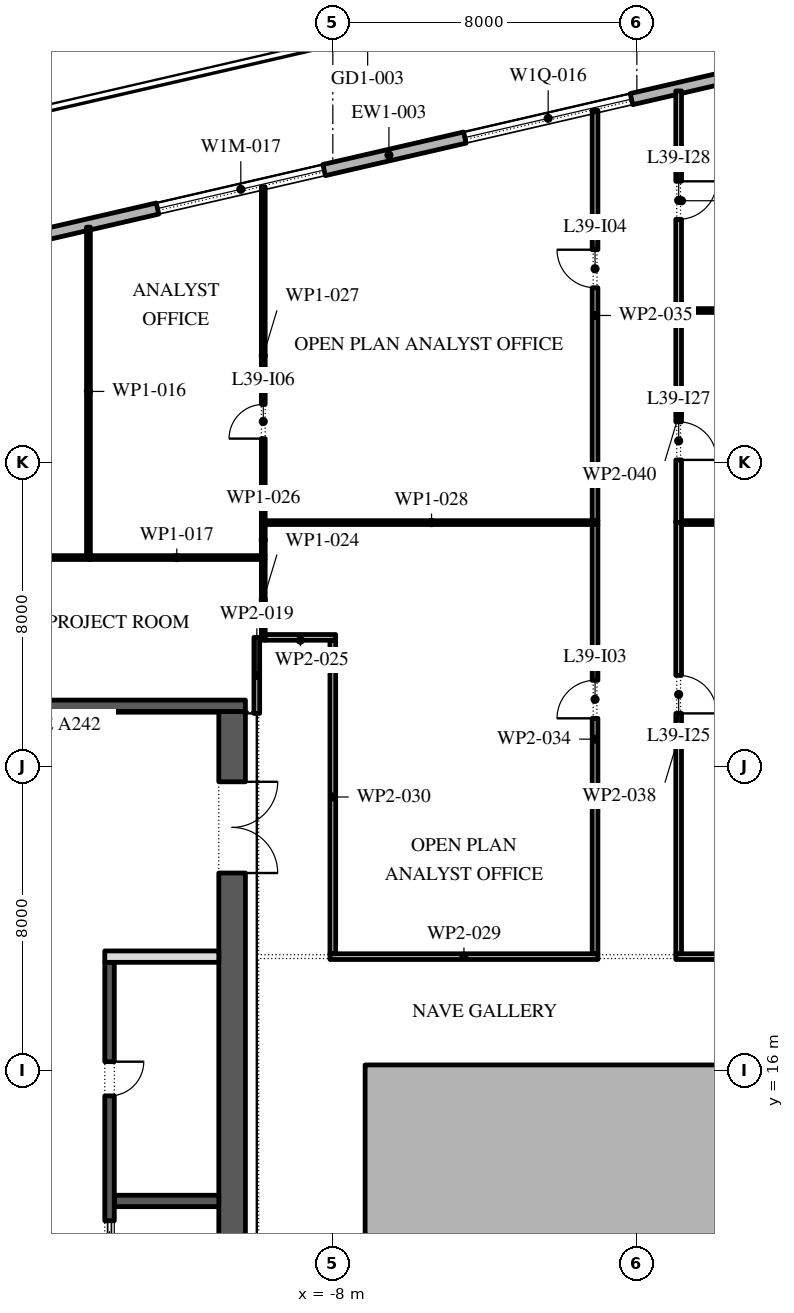
"""IFC4 building model, lengths in metres.
Left out: names, types, materials, properties, quantities, classifications, styles, units other than length and angle.
Written with IfcOpenShell. Run it as: python <this file> out.ifc"""

import sys

from ifc_helpers import new_model, si_unit, direction, frame, frame_2d, origin, origin_2d, place, context, subcontext, project, spatial, polyline, rectangle, outline, extrude, element, fill, save


model = new_model("IFC4")
c1 = context("Model", 3, precision=1e-05, world=origin(), true_north=direction((0.0, 1.0)))
c2 = subcontext(c1, "Body", "Model", "MODEL_VIEW")
j1 = project(units=[si_unit("LENGTHUNIT", "METRE"), si_unit("PLANEANGLEUNIT", "RADIAN")], contexts=[c1])
p1 = place(None, origin())
s1 = spatial("IfcSite", under=j1, at=p1, CompositionType="ELEMENT")
p2 = place(p1, origin())
s2 = spatial("IfcBuilding", under=s1, at=p2, CompositionType="ELEMENT")
p3 = place(p2, frame((0.0, 0.0, 180.0)))
s3 = spatial("IfcBuildingStorey", under=s2, at=p3, CompositionType="ELEMENT", Elevation=180.0)
p4 = place(p3, frame((-16.09, 41.74, 0.0), z_axis=(-0.018825666958, 0.081616506903, 0.99648599592), x_axis=(-0.974414501624, -0.224758490439, 0.0)))
e1 = element("IfcColumn", 1, at=p4, inside=s3, PredefinedType="COLUMN", context=c2, shape_type="SweptSolid", body=[
    extrude(rectangle(XDim=1.2, YDim=1.2, at=origin_2d()), origin(), (0.0, 0.0, 1.0), 4.215),
])
p5 = place(p3, origin())
e2 = element("IfcWall", 2, at=p5, inside=s3, PredefinedType="STANDARD", context=c2, shape_type="SweptSolid", body=[
    extrude(outline(polyline([(-7.15, -2.15), (7.15, -2.15), (7.15, 16.15), (-7.15, 16.15), (-7.15, -2.15)]), holes=[polyline([(-7.0, -2.0), (-7.0, 16.0), (7.0, 16.0), (7.0, -2.0), (-7.0, -2.0)])]), origin(), (0.0, 0.0, 1.0), 4.0),
])
p6 = place(p3, frame((17.592, 45.657, 0.0), z_axis=(0.0, 0.0, 1.0), x_axis=(-0.974370243697, -0.224950279389, 0.0)))
e3 = element("IfcWall", 3, at=p6, inside=s3, PredefinedType="STANDARD", context=c2, shape_type="SweptSolid", body=[
    extrude(rectangle(XDim=49.5, YDim=0.3, at=frame_2d((24.75, 0.0))), origin(), (0.0, 0.0, 1.0), 4.0),
])
p7 = place(p6, frame((2.8, 0.0, 0.0)))
e4 = element("IfcOpeningElement", 4, at=p7, cuts=e3, PredefinedType="OPENING", context=c2, shape_type="SweptSolid", body=[
    extrude(rectangle(XDim=2.4, YDim=3.5, at=frame_2d((1.2, 1.75))), frame((0.0, 0.16, 0.0), z_axis=(0.0, -1.0, 0.0), x_axis=(1.0, 0.0, 0.0)), (0.0, 0.0, 1.0), 0.32),
])
p8 = place(p6, frame((9.9, 0.0, 0.45)))
e5 = element("IfcOpeningElement", 5, at=p8, cuts=e3, PredefinedType="OPENING", context=c2, shape_type="SweptSolid", body=[
    extrude(rectangle(XDim=4.5, YDim=2.45, at=frame_2d((2.25, 1.225))), frame((0.0, 0.16, 0.0), z_axis=(0.0, -1.0, 0.0), x_axis=(1.0, 0.0, 0.0)), (0.0, 0.0, 1.0), 0.32),
])
p9 = place(p6, frame((18.2, 0.0, 0.45)))
e6 = element("IfcOpeningElement", 6, at=p9, cuts=e3, PredefinedType="OPENING", context=c2, shape_type="SweptSolid", body=[
    extrude(rectangle(XDim=4.5, YDim=2.45, at=frame_2d((2.25, 1.225))), frame((0.0, 0.16, 0.0), z_axis=(0.0, -1.0, 0.0), x_axis=(1.0, 0.0, 0.0)), (0.0, 0.0, 1.0), 0.32),
])
p10 = place(p6, frame((26.5, 0.0, 0.45)))
e7 = element("IfcOpeningElement", 7, at=p10, cuts=e3, PredefinedType="OPENING", context=c2, shape_type="SweptSolid", body=[
    extrude(rectangle(XDim=4.5, YDim=2.575, at=frame_2d((2.25, 1.288))), frame((0.0, 0.16, 0.0), z_axis=(0.0, -1.0, 0.0), x_axis=(1.0, 0.0, 0.0)), (0.0, 0.0, 1.0), 0.32),
])
p11 = place(p6, frame((35.85, 0.0, 0.0)))
e8 = element("IfcOpeningElement", 8, at=p11, cuts=e3, PredefinedType="OPENING", context=c2, shape_type="SweptSolid", body=[
    extrude(rectangle(XDim=2.4, YDim=3.5, at=frame_2d((1.2, 1.75))), frame((0.0, 0.16, 0.0), z_axis=(0.0, -1.0, 0.0), x_axis=(1.0, 0.0, 0.0)), (0.0, 0.0, 1.0), 0.32),
])
p12 = place(p6, frame((43.1, 0.0, 0.45)))
e9 = element("IfcOpeningElement", 9, at=p12, cuts=e3, PredefinedType="OPENING", context=c2, shape_type="SweptSolid", body=[
    extrude(rectangle(XDim=4.5, YDim=2.75, at=frame_2d((2.25, 1.375))), frame((0.0, 0.16, 0.0), z_axis=(0.0, -1.0, 0.0), x_axis=(1.0, 0.0, 0.0)), (0.0, 0.0, 1.0), 0.32),
])
p13 = place(p3, frame((-10.65, -2.45, 0.0), z_axis=(0.0, 0.0, 1.0), x_axis=(0.0, 1.0, 0.0)))
e10 = element("IfcWall", 10, at=p13, inside=s3, PredefinedType="SHEAR", context=c2, shape_type="SweptSolid", body=[
    extrude(rectangle(XDim=27.9, YDim=0.7, at=frame_2d((13.95, 0.0))), origin(), (0.0, 0.0, 1.0), 4.0),
])
p14 = place(p13, frame((23.65, 0.0, 0.0)))
e11 = element("IfcOpeningElement", 11, at=p14, cuts=e10, PredefinedType="OPENING", context=c2, shape_type="SweptSolid", body=[
    extrude(rectangle(XDim=2.4, YDim=2.1, at=frame_2d((1.2, 1.05))), frame((0.0, 0.36, 0.0), z_axis=(0.0, -1.0, 0.0), x_axis=(1.0, 0.0, 0.0)), (0.0, 0.0, 1.0), 0.72),
])
p15 = place(p13, frame((1.087, 0.0, 0.0)))
e12 = element("IfcOpeningElement", 12, at=p15, cuts=e10, PredefinedType="OPENING", context=c2, shape_type="SweptSolid", body=[
    extrude(rectangle(XDim=0.9, YDim=2.1, at=frame_2d((0.45, 1.05))), frame((0.0, 0.36, 0.0), z_axis=(0.0, -1.0, 0.0), x_axis=(1.0, 0.0, 0.0)), (0.0, 0.0, 1.0), 0.72),
])
p16 = place(p13, frame((4.262, 0.0, 0.0)))
e13 = element("IfcOpeningElement", 13, at=p16, cuts=e10, PredefinedType="OPENING", context=c2, shape_type="SweptSolid", body=[
    extrude(rectangle(XDim=1.0, YDim=2.1, at=frame_2d((0.5, 1.05))), frame((0.0, 0.36, 0.0), z_axis=(0.0, -1.0, 0.0), x_axis=(1.0, 0.0, 0.0)), (0.0, 0.0, 1.0), 0.72),
])
p17 = place(p3, frame((-21.7, 25.6, 0.0), z_axis=(0.0, 0.0, 1.0), x_axis=(1.0, 0.0, 0.0)))
e14 = element("IfcWall", 14, at=p17, inside=s3, PredefinedType="SHEAR", context=c2, shape_type="SweptSolid", body=[
    extrude(rectangle(XDim=11.4, YDim=0.3, at=frame_2d((5.7, 0.0))), origin(), (0.0, 0.0, 1.0), 4.0),
])
p18 = place(p3, frame((-13.75, 12.571, 0.0), z_axis=(0.0, 0.0, 1.0), x_axis=(1.0, 0.0, 0.0)))
e15 = element("IfcWall", 15, at=p18, inside=s3, PredefinedType="SHEAR", context=c2, shape_type="SweptSolid", body=[
    extrude(rectangle(XDim=2.75, YDim=0.3, at=frame_2d((1.375, 0.0))), origin(), (0.0, 0.0, 1.0), 4.0),
])
p19 = place(p3, frame((-13.875, -2.45, 0.0), z_axis=(0.0, 0.0, 1.0), x_axis=(0.0, 1.0, 0.0)))
e16 = element("IfcWall", 16, at=p19, inside=s3, PredefinedType="SHEAR", context=c2, shape_type="SweptSolid", body=[
    extrude(rectangle(XDim=21.3, YDim=0.25, at=frame_2d((10.65, 0.0))), origin(), (0.0, 0.0, 1.0), 4.0),
])
p20 = place(p19, frame((17.786, 0.0, 0.0)))
e17 = element("IfcOpeningElement", 17, at=p20, cuts=e16, PredefinedType="OPENING", context=c2, shape_type="SweptSolid", body=[
    extrude(rectangle(XDim=0.9, YDim=2.1, at=frame_2d((0.45, 1.05))), frame((0.0, 0.135, 0.0), z_axis=(0.0, -1.0, 0.0), x_axis=(1.0, 0.0, 0.0)), (0.0, 0.0, 1.0), 0.27),
])
p21 = place(p19, frame((6.971, 0.0, 0.0)))
e18 = element("IfcOpeningElement", 18, at=p21, cuts=e16, PredefinedType="OPENING", context=c2, shape_type="SweptSolid", body=[
    extrude(rectangle(XDim=1.1, YDim=2.1, at=frame_2d((0.55, 1.05))), frame((0.0, 0.135, 0.0), z_axis=(0.0, -1.0, 0.0), x_axis=(1.0, 0.0, 0.0)), (0.0, 0.0, 1.0), 0.27),
])
p22 = place(p19, frame((9.114, 0.0, 0.0)))
e19 = element("IfcOpeningElement", 19, at=p22, cuts=e16, PredefinedType="OPENING", context=c2, shape_type="SweptSolid", body=[
    extrude(rectangle(XDim=1.1, YDim=2.1, at=frame_2d((0.55, 1.05))), frame((0.0, 0.135, 0.0), z_axis=(0.0, -1.0, 0.0), x_axis=(1.0, 0.0, 0.0)), (0.0, 0.0, 1.0), 0.27),
])
p23 = place(p19, frame((11.257, 0.0, 0.0)))
e20 = element("IfcOpeningElement", 20, at=p23, cuts=e16, PredefinedType="OPENING", context=c2, shape_type="SweptSolid", body=[
    extrude(rectangle(XDim=1.1, YDim=2.1, at=frame_2d((0.55, 1.05))), frame((0.0, 0.135, 0.0), z_axis=(0.0, -1.0, 0.0), x_axis=(1.0, 0.0, 0.0)), (0.0, 0.0, 1.0), 0.27),
])
p24 = place(p19, frame((13.4, 0.0, 0.0)))
e21 = element("IfcOpeningElement", 21, at=p24, cuts=e16, PredefinedType="OPENING", context=c2, shape_type="SweptSolid", body=[
    extrude(rectangle(XDim=1.1, YDim=2.1, at=frame_2d((0.55, 1.05))), frame((0.0, 0.135, 0.0), z_axis=(0.0, -1.0, 0.0), x_axis=(1.0, 0.0, 0.0)), (0.0, 0.0, 1.0), 0.27),
])
p25 = place(p3, frame((-14.0, 19.0, 0.0), z_axis=(0.0, 0.0, 1.0), x_axis=(1.0, 0.0, 0.0)))
e22 = element("IfcWall", 22, at=p25, inside=s3, PredefinedType="PARTITIONING", context=c2, shape_type="SweptSolid", body=[
    extrude(rectangle(XDim=3.0, YDim=0.3, at=frame_2d((1.5, 0.0))), origin(), (0.0, 0.0, 1.0), 4.0),
])
p26 = place(p3, frame((-22.47, 29.5, 0.0), z_axis=(0.0, 0.0, 1.0), x_axis=(1.0, 0.0, 0.0)))
e23 = element("IfcWall", 23, at=p26, inside=s3, PredefinedType="PARTITIONING", context=c2, shape_type="SweptSolid", body=[
    extrude(rectangle(XDim=8.09, YDim=0.1, at=frame_2d((4.045, 0.0))), origin(), (0.0, 0.0, 1.0), 4.0),
])
p27 = place(p26, frame((3.44, 0.0, 0.0)))
e24 = element("IfcOpeningElement", 24, at=p27, cuts=e23, PredefinedType="OPENING", context=c2, shape_type="SweptSolid", body=[
    extrude(rectangle(XDim=0.9, YDim=2.1, at=frame_2d((0.45, 1.05))), frame((0.0, 0.06, 0.0), z_axis=(0.0, -1.0, 0.0), x_axis=(1.0, 0.0, 0.0)), (0.0, 0.0, 1.0), 0.12),
])
p28 = place(p3, frame((-14.43, 29.55, 0.0), z_axis=(0.0, 0.0, 1.0), x_axis=(0.0, 1.0, 0.0)))
e25 = element("IfcWall", 25, at=p28, inside=s3, PredefinedType="PARTITIONING", context=c2, shape_type="SweptSolid", body=[
    extrude(rectangle(XDim=8.643, YDim=0.1, at=frame_2d((4.322, 0.0))), origin(), (0.0, 0.0, 1.0), 4.0),
])
p29 = place(p3, frame((-14.43, 29.5, 0.0), z_axis=(0.0, 0.0, 1.0), x_axis=(1.0, 0.0, 0.0)))
e26 = element("IfcWall", 26, at=p29, inside=s3, PredefinedType="PARTITIONING", context=c2, shape_type="SweptSolid", body=[
    extrude(rectangle(XDim=4.65, YDim=0.1, at=frame_2d((2.325, 0.0))), origin(), (0.0, 0.0, 1.0), 4.0),
])
p30 = place(p3, frame((-10.0, 25.4, 0.0), z_axis=(0.0, 0.0, 1.0), x_axis=(0.0, 1.0, 0.0)))
e27 = element("IfcWall", 27, at=p30, inside=s3, PredefinedType="PARTITIONING", context=c2, shape_type="SweptSolid", body=[
    extrude(rectangle(XDim=2.0, YDim=0.15, at=frame_2d((1.0, 0.0))), origin(), (0.0, 0.0, 1.0), 4.0),
])
p31 = place(p3, frame((-9.83, 27.325, 0.0), z_axis=(0.0, 0.0, 1.0), x_axis=(0.0, 1.0, 0.0)))
e28 = element("IfcWall", 28, at=p31, inside=s3, PredefinedType="PARTITIONING", context=c2, shape_type="SweptSolid", body=[
    extrude(rectangle(XDim=2.125, YDim=0.1, at=frame_2d((1.062, 0.0))), origin(), (0.0, 0.0, 1.0), 4.0),
])
p32 = place(p3, frame((-9.78, 27.4, 0.0), z_axis=(0.0, 0.0, 1.0), x_axis=(1.0, 0.0, 0.0)))
e29 = element("IfcWall", 29, at=p32, inside=s3, PredefinedType="PARTITIONING", context=c2, shape_type="SweptSolid", body=[
    extrude(rectangle(XDim=1.855, YDim=0.15, at=frame_2d((0.927, 0.0))), origin(), (0.0, 0.0, 1.0), 4.0),
])
p33 = place(p3, frame((-9.83, 29.55, 0.0), z_axis=(0.0, 0.0, 1.0), x_axis=(0.0, 1.0, 0.0)))
e30 = element("IfcWall", 30, at=p33, inside=s3, PredefinedType="PARTITIONING", context=c2, shape_type="SweptSolid", body=[
    extrude(rectangle(XDim=0.82, YDim=0.1, at=frame_2d((0.41, 0.0))), origin(), (0.0, 0.0, 1.0), 4.0),
])
p34 = place(p3, frame((-9.83, 30.37, 0.0), z_axis=(0.0, 0.0, 1.0), x_axis=(0.0, 1.0, 0.0)))
e31 = element("IfcWall", 31, at=p34, inside=s3, PredefinedType="PARTITIONING", context=c2, shape_type="SweptSolid", body=[
    extrude(rectangle(XDim=8.885, YDim=0.1, at=frame_2d((4.442, 0.0))), origin(), (0.0, 0.0, 1.0), 4.0),
])
p35 = place(p34, frame((2.26, 0.0, 0.0)))
e32 = element("IfcOpeningElement", 32, at=p35, cuts=e31, PredefinedType="OPENING", context=c2, shape_type="SweptSolid", body=[
    extrude(rectangle(XDim=0.9, YDim=2.1, at=frame_2d((0.45, 1.05))), frame((0.0, 0.06, 0.0), z_axis=(0.0, -1.0, 0.0), x_axis=(1.0, 0.0, 0.0)), (0.0, 0.0, 1.0), 0.12),
])
p36 = place(p3, frame((-9.78, 30.42, 0.0), z_axis=(0.0, 0.0, 1.0), x_axis=(1.0, 0.0, 0.0)))
e33 = element("IfcWall", 33, at=p36, inside=s3, PredefinedType="PARTITIONING", context=c2, shape_type="SweptSolid", body=[
    extrude(rectangle(XDim=8.755, YDim=0.1, at=frame_2d((4.377, 0.0))), origin(), (0.0, 0.0, 1.0), 4.0),
])
p37 = place(p3, frame((-8.075, 19.0, 0.0), z_axis=(0.0, 0.0, 1.0), x_axis=(1.0, 0.0, 0.0)))
e34 = element("IfcWall", 34, at=p37, inside=s3, PredefinedType="PARTITIONING", context=c2, shape_type="SweptSolid", body=[
    extrude(rectangle(XDim=7.05, YDim=0.15, at=frame_2d((3.525, 0.0))), origin(), (0.0, 0.0, 1.0), 4.0),
])
p38 = place(p3, frame((-8.0, 27.325, 0.0), z_axis=(0.0, 0.0, 1.0), x_axis=(0.0, -1.0, 0.0)))
e35 = element("IfcWall", 35, at=p38, inside=s3, PredefinedType="PARTITIONING", context=c2, shape_type="SweptSolid", body=[
    extrude(rectangle(XDim=8.25, YDim=0.15, at=frame_2d((4.125, 0.0))), origin(), (0.0, 0.0, 1.0), 4.0),
])
p39 = place(p3, frame((-1.1, 19.075, 0.0), z_axis=(0.0, 0.0, 1.0), x_axis=(0.0, 1.0, 0.0)))
e36 = element("IfcWall", 36, at=p39, inside=s3, PredefinedType="PARTITIONING", context=c2, shape_type="SweptSolid", body=[
    extrude(rectangle(XDim=11.295, YDim=0.15, at=frame_2d((5.647, 0.0))), origin(), (0.0, 0.0, 1.0), 4.0),
])
p40 = place(p39, frame((6.195, 0.0, 0.0)))
e37 = element("IfcOpeningElement", 37, at=p40, cuts=e36, PredefinedType="OPENING", context=c2, shape_type="SweptSolid", body=[
    extrude(rectangle(XDim=1.0, YDim=2.1, at=frame_2d((0.5, 1.05))), frame((0.0, 0.085, 0.0), z_axis=(0.0, -1.0, 0.0), x_axis=(1.0, 0.0, 0.0)), (0.0, 0.0, 1.0), 0.17),
])
p41 = place(p3, frame((-1.1, 30.47, 0.0), z_axis=(0.0, 0.0, 1.0), x_axis=(0.0, 1.0, 0.0)))
e38 = element("IfcWall", 38, at=p41, inside=s3, PredefinedType="PARTITIONING", context=c2, shape_type="SweptSolid", body=[
    extrude(rectangle(XDim=10.8, YDim=0.15, at=frame_2d((5.4, 0.0))), origin(), (0.0, 0.0, 1.0), 4.0),
])
p42 = place(p41, frame((6.13, 0.0, 0.0)))
e39 = element("IfcOpeningElement", 39, at=p42, cuts=e38, PredefinedType="OPENING", context=c2, shape_type="SweptSolid", body=[
    extrude(rectangle(XDim=1.0, YDim=2.1, at=frame_2d((0.5, 1.05))), frame((0.0, 0.085, 0.0), z_axis=(0.0, -1.0, 0.0), x_axis=(1.0, 0.0, 0.0)), (0.0, 0.0, 1.0), 0.17),
])
p43 = place(p3, frame((1.025, 19.0, 0.0), z_axis=(0.0, 0.0, 1.0), x_axis=(1.0, 0.0, 0.0)))
e40 = element("IfcWall", 40, at=p43, inside=s3, PredefinedType="PARTITIONING", context=c2, shape_type="SweptSolid", body=[
    extrude(rectangle(XDim=7.05, YDim=0.15, at=frame_2d((3.525, 0.0))), origin(), (0.0, 0.0, 1.0), 4.0),
])
p44 = place(p3, frame((1.1, 30.47, 0.0), z_axis=(0.0, 0.0, 1.0), x_axis=(0.0, -1.0, 0.0)))
e41 = element("IfcWall", 41, at=p44, inside=s3, PredefinedType="PARTITIONING", context=c2, shape_type="SweptSolid", body=[
    extrude(rectangle(XDim=11.395, YDim=0.15, at=frame_2d((5.698, 0.0))), origin(), (0.0, 0.0, 1.0), 4.0),
])
p45 = place(p44, frame((4.07, 0.0, 0.0)))
e42 = element("IfcOpeningElement", 42, at=p45, cuts=e41, PredefinedType="OPENING", context=c2, shape_type="SweptSolid", body=[
    extrude(rectangle(XDim=1.0, YDim=2.1, at=frame_2d((0.5, 1.05))), frame((0.0, 0.085, 0.0), z_axis=(0.0, -1.0, 0.0), x_axis=(1.0, 0.0, 0.0)), (0.0, 0.0, 1.0), 0.17),
])
p46 = place(p3, frame((1.175, 30.42, 0.0), z_axis=(0.0, 0.0, 1.0), x_axis=(1.0, 0.0, 0.0)))
e43 = element("IfcWall", 43, at=p46, inside=s3, PredefinedType="PARTITIONING", context=c2, shape_type="SweptSolid", body=[
    extrude(rectangle(XDim=9.375, YDim=0.1, at=frame_2d((4.688, 0.0))), origin(), (0.0, 0.0, 1.0), 4.0),
])
p47 = place(p3, frame((1.1, 36.05, 0.0), z_axis=(0.0, 0.0, 1.0), x_axis=(0.0, -1.0, 0.0)))
e44 = element("IfcWall", 44, at=p47, inside=s3, PredefinedType="PARTITIONING", context=c2, shape_type="SweptSolid", body=[
    extrude(rectangle(XDim=5.63, YDim=0.15, at=frame_2d((2.815, 0.0))), origin(), (0.0, 0.0, 1.0), 4.0),
])
p48 = place(p47, frame((2.98, 0.0, 0.0)))
e45 = element("IfcOpeningElement", 45, at=p48, cuts=e44, PredefinedType="OPENING", context=c2, shape_type="SweptSolid", body=[
    extrude(rectangle(XDim=1.0, YDim=2.1, at=frame_2d((0.5, 1.05))), frame((0.0, 0.085, 0.0), z_axis=(0.0, -1.0, 0.0), x_axis=(1.0, 0.0, 0.0)), (0.0, 0.0, 1.0), 0.17),
])
p49 = place(p3, frame((1.175, 36.0, 0.0), z_axis=(0.0, 0.0, 1.0), x_axis=(1.0, 0.0, 0.0)))
e46 = element("IfcWall", 46, at=p49, inside=s3, PredefinedType="PARTITIONING", context=c2, shape_type="SweptSolid", body=[
    extrude(rectangle(XDim=8.705, YDim=0.1, at=frame_2d((4.353, 0.0))), origin(), (0.0, 0.0, 1.0), 4.0),
])
p50 = place(p3, frame((1.1, 41.778, 0.0), z_axis=(0.0, 0.0, 1.0), x_axis=(0.0, -1.0, 0.0)))
e47 = element("IfcWall", 47, at=p50, inside=s3, PredefinedType="PARTITIONING", context=c2, shape_type="SweptSolid", body=[
    extrude(rectangle(XDim=5.778, YDim=0.15, at=frame_2d((2.889, 0.0))), origin(), (0.0, 0.0, 1.0), 4.0),
])
p51 = place(p50, frame((2.378, 0.0, 0.0)))
e48 = element("IfcOpeningElement", 48, at=p51, cuts=e47, PredefinedType="OPENING", context=c2, shape_type="SweptSolid", body=[
    extrude(rectangle(XDim=1.0, YDim=2.1, at=frame_2d((0.5, 1.05))), frame((0.0, 0.085, 0.0), z_axis=(0.0, -1.0, 0.0), x_axis=(1.0, 0.0, 0.0)), (0.0, 0.0, 1.0), 0.17),
])
p52 = place(p9, origin())
e49 = element("IfcWindow", 49, at=p52, inside=s3, PartitioningType="DOUBLE_PANEL_VERTICAL", PredefinedType="WINDOW", context=c2, shape_type="SweptSolid", body=[
    extrude(rectangle(XDim=4.5, YDim=2.45, at=frame_2d((2.25, 1.225))), frame((0.0, 0.03, 0.0), z_axis=(0.0, -1.0, 0.0), x_axis=(1.0, 0.0, 0.0)), (0.0, 0.0, 1.0), 0.06),
])
fill(e6, e49)
p53 = place(p10, origin())
e50 = element("IfcWindow", 50, at=p53, inside=s3, PartitioningType="DOUBLE_PANEL_VERTICAL", PredefinedType="WINDOW", context=c2, shape_type="SweptSolid", body=[
    extrude(rectangle(XDim=4.5, YDim=2.575, at=frame_2d((2.25, 1.288))), frame((0.0, 0.03, 0.0), z_axis=(0.0, -1.0, 0.0), x_axis=(1.0, 0.0, 0.0)), (0.0, 0.0, 1.0), 0.06),
])
fill(e7, e50)
p54 = place(p20, frame((0.9, -0.2, 0.0), z_axis=(0.0, 0.0, 1.0), x_axis=(-1.0, 0.0, 0.0)))
e51 = element("IfcDoor", 51, at=p54, inside=s3, OperationType="SINGLE_SWING_RIGHT", PredefinedType="DOOR", context=c2, shape_type="SweptSolid", body=[
    extrude(rectangle(XDim=0.9, YDim=2.1, at=frame_2d((0.45, 1.05))), frame((0.0, -0.075, 0.0), z_axis=(0.0, -1.0, 0.0), x_axis=(1.0, 0.0, 0.0)), (0.0, 0.0, 1.0), 0.05),
])
fill(e17, e51)
p55 = place(p24, origin())
e52 = element("IfcDoor", 52, at=p55, inside=s3, OperationType="SLIDING_TO_LEFT", PredefinedType="DOOR", context=c2, shape_type="SweptSolid", body=[
    extrude(rectangle(XDim=1.1, YDim=2.1, at=frame_2d((0.55, 1.05))), frame((0.0, 0.025, 0.0), z_axis=(0.0, -1.0, 0.0), x_axis=(1.0, 0.0, 0.0)), (0.0, 0.0, 1.0), 0.05),
])
fill(e21, e52)
p56 = place(p14, frame((2.4, 0.0, 0.0), z_axis=(0.0, 0.0, 1.0), x_axis=(-1.0, 0.0, 0.0)))
e53 = element("IfcDoor", 53, at=p56, inside=s3, OperationType="DOUBLE_DOOR_SINGLE_SWING", PredefinedType="DOOR", context=c2, shape_type="SweptSolid", body=[
    extrude(rectangle(XDim=2.4, YDim=2.1, at=frame_2d((1.2, 1.05))), frame((0.0, 0.025, 0.0), z_axis=(0.0, -1.0, 0.0), x_axis=(1.0, 0.0, 0.0)), (0.0, 0.0, 1.0), 0.05),
])
fill(e11, e53)
p57 = place(p40, origin())
e54 = element("IfcDoor", 54, at=p57, inside=s3, OperationType="SINGLE_SWING_RIGHT", PredefinedType="DOOR", context=c2, shape_type="SweptSolid", body=[
    extrude(rectangle(XDim=1.0, YDim=2.1, at=frame_2d((0.5, 1.05))), frame((0.0, 0.025, 0.0), z_axis=(0.0, -1.0, 0.0), x_axis=(1.0, 0.0, 0.0)), (0.0, 0.0, 1.0), 0.05),
])
fill(e37, e54)
p58 = place(p42, origin())
e55 = element("IfcDoor", 55, at=p58, inside=s3, OperationType="SINGLE_SWING_LEFT", PredefinedType="DOOR", context=c2, shape_type="SweptSolid", body=[
    extrude(rectangle(XDim=1.0, YDim=2.1, at=frame_2d((0.5, 1.05))), frame((0.0, 0.025, 0.0), z_axis=(0.0, -1.0, 0.0), x_axis=(1.0, 0.0, 0.0)), (0.0, 0.0, 1.0), 0.05),
])
fill(e39, e55)
p59 = place(p35, origin())
e56 = element("IfcDoor", 56, at=p59, inside=s3, OperationType="SINGLE_SWING_RIGHT", PredefinedType="DOOR", context=c2, shape_type="SweptSolid", body=[
    extrude(rectangle(XDim=0.9, YDim=2.1, at=frame_2d((0.45, 1.05))), frame((0.0, 0.025, 0.0), z_axis=(0.0, -1.0, 0.0), x_axis=(1.0, 0.0, 0.0)), (0.0, 0.0, 1.0), 0.05),
])
fill(e32, e56)
p60 = place(p45, origin())
e57 = element("IfcDoor", 57, at=p60, inside=s3, OperationType="SINGLE_SWING_LEFT", PredefinedType="DOOR", context=c2, shape_type="SweptSolid", body=[
    extrude(rectangle(XDim=1.0, YDim=2.1, at=frame_2d((0.5, 1.05))), frame((0.0, 0.025, 0.0), z_axis=(0.0, -1.0, 0.0), x_axis=(1.0, 0.0, 0.0)), (0.0, 0.0, 1.0), 0.05),
])
fill(e42, e57)
p61 = place(p48, origin())
e58 = element("IfcDoor", 58, at=p61, inside=s3, OperationType="SINGLE_SWING_LEFT", PredefinedType="DOOR", context=c2, shape_type="SweptSolid", body=[
    extrude(rectangle(XDim=1.0, YDim=2.1, at=frame_2d((0.5, 1.05))), frame((0.0, 0.025, 0.0), z_axis=(0.0, -1.0, 0.0), x_axis=(1.0, 0.0, 0.0)), (0.0, 0.0, 1.0), 0.05),
])
fill(e45, e58)
p62 = place(p51, origin())
e59 = element("IfcDoor", 59, at=p62, inside=s3, OperationType="SINGLE_SWING_RIGHT", PredefinedType="DOOR", context=c2, shape_type="SweptSolid", body=[
    extrude(rectangle(XDim=1.0, YDim=2.1, at=frame_2d((0.5, 1.05))), frame((0.0, 0.025, 0.0), z_axis=(0.0, -1.0, 0.0), x_axis=(1.0, 0.0, 0.0)), (0.0, 0.0, 1.0), 0.05),
])
fill(e48, e59)
save(model, sys.argv[1])
